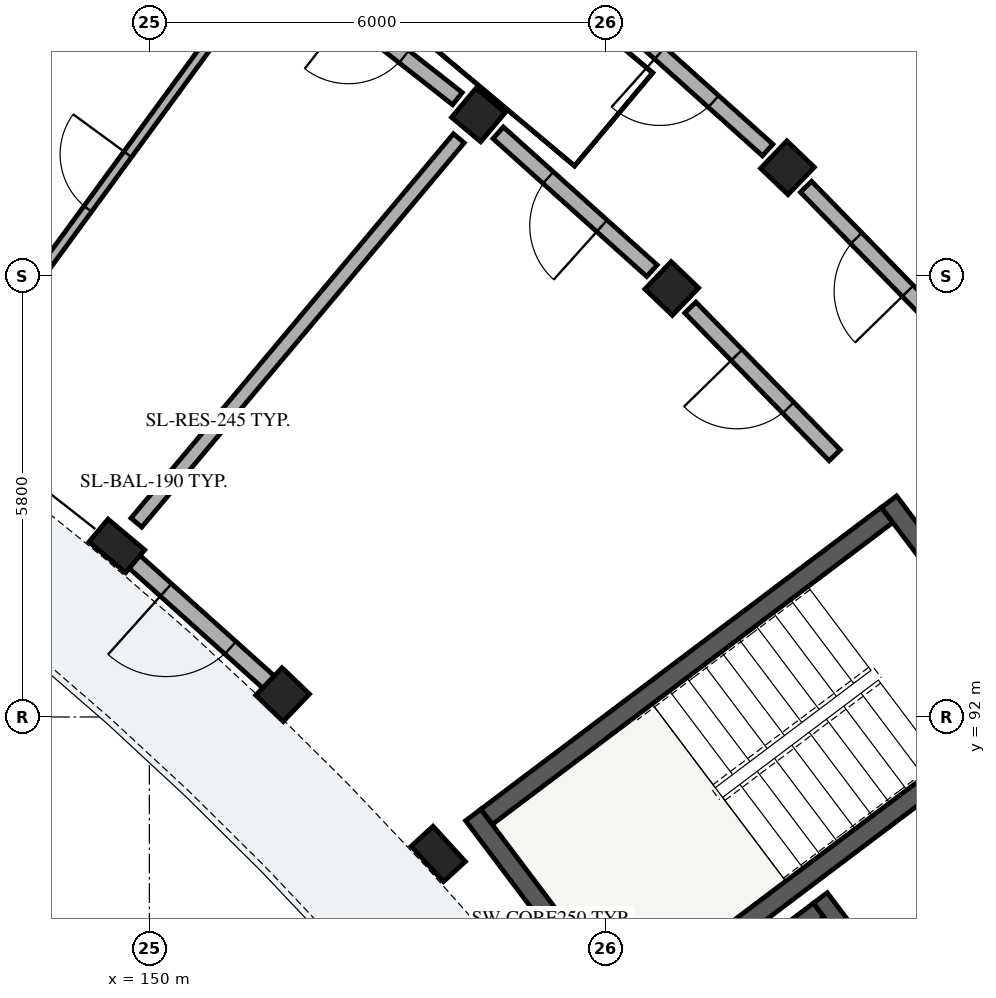
"""IFC4 building model, lengths in metres.
Left out: names, types, materials, properties, quantities, classifications, styles, units other than length and angle.
Written with IfcOpenShell. Run it as: python <this file> out.ifc"""

import sys

from ifc_helpers import new_model, si_unit, direction, frame, frame_2d, origin, origin_2d, place, context, subcontext, project, spatial, rectangle, extrude, element, fill, save


model = new_model("IFC4")
c1 = context("Model", 3, precision=1e-05, world=origin(), true_north=direction((0.0, 1.0)))
c2 = subcontext(c1, "Body", "Model", "MODEL_VIEW")
j1 = project(units=[si_unit("LENGTHUNIT", "METRE"), si_unit("PLANEANGLEUNIT", "RADIAN")], contexts=[c1])
p1 = place(None, origin())
s1 = spatial("IfcSite", under=j1, at=p1, CompositionType="ELEMENT")
p2 = place(p1, origin())
s2 = spatial("IfcBuilding", under=s1, at=p2, CompositionType="ELEMENT")
p3 = place(p2, frame((0.0, 0.0, 32.36)))
s3 = spatial("IfcBuildingStorey", under=s2, at=p3, CompositionType="ELEMENT", Elevation=32.36)
p4 = place(p3, frame((159.707, 94.658, 0.0), z_axis=(0.0, 0.0, 1.0), x_axis=(-0.798639633744, -0.601809550782, 0.0)))
e1 = element("IfcWall", 1, at=p4, inside=s3, PredefinedType="SHEAR", context=c2, shape_type="SweptSolid", body=[
    extrude(rectangle(XDim=6.6, YDim=0.25, at=frame_2d((3.3, 0.0))), origin(), (0.0, 0.0, 1.0), 3.11),
])
p5 = place(p3, frame((154.261, 90.711, 0.0), z_axis=(0.0, 0.0, 1.0), x_axis=(0.601825826579, -0.798627368967, 0.0)))
e2 = element("IfcWall", 2, at=p5, inside=s3, PredefinedType="SHEAR", context=c2, shape_type="SweptSolid", body=[
    extrude(rectangle(XDim=3.42, YDim=0.25, at=frame_2d((1.71, 0.0))), origin(), (0.0, 0.0, 1.0), 3.11),
])
p6 = place(p3, frame((159.731, 94.833, 0.0), z_axis=(0.0, 0.0, 1.0), x_axis=(0.601814606132, -0.798635824294, 0.0)))
e3 = element("IfcWall", 3, at=p6, inside=s3, PredefinedType="SHEAR", context=c2, shape_type="SweptSolid", body=[
    extrude(rectangle(XDim=3.42, YDim=0.25, at=frame_2d((1.71, 0.0))), origin(), (0.0, 0.0, 1.0), 3.11),
])
p7 = place(p3, frame((161.615, 92.126, 0.0), z_axis=(0.0, 0.0, 1.0), x_axis=(-0.798639633744, -0.601809550782, 0.0)))
e4 = element("IfcWall", 4, at=p7, inside=s3, PredefinedType="SHEAR", context=c2, shape_type="SweptSolid", body=[
    extrude(rectangle(XDim=6.6, YDim=0.25, at=frame_2d((3.3, 0.0))), origin(), (0.0, 0.0, 1.0), 3.11),
])
p8 = place(p7, frame((0.22, 0.0, 0.0)))
e5 = element("IfcOpeningElement", 5, at=p8, cuts=e4, PredefinedType="OPENING", context=c2, shape_type="SweptSolid", body=[
    extrude(rectangle(XDim=1.05, YDim=2.15, at=frame_2d((0.525, 1.075))), frame((0.0, 0.135, 0.0), z_axis=(0.0, -1.0, 0.0), x_axis=(1.0, 0.0, 0.0)), (0.0, 0.0, 1.0), 0.27),
])
p9 = place(p3, frame((158.827, 89.619, 0.0), z_axis=(0.0, 0.0, 1.0), x_axis=(0.601819781152, -0.798631924615, 0.0)))
e6 = element("IfcWall", 6, at=p9, inside=s3, PredefinedType="SHEAR", context=c2, shape_type="SweptSolid", body=[
    extrude(rectangle(XDim=3.26, YDim=0.23, at=frame_2d((1.63, 0.0))), origin(), (0.0, 0.0, 1.0), 3.11),
])
p10 = place(p9, frame((0.9, 0.0, 0.0)))
e7 = element("IfcOpeningElement", 7, at=p10, cuts=e6, PredefinedType="OPENING", context=c2, shape_type="SweptSolid", body=[
    extrude(rectangle(XDim=1.1, YDim=2.15, at=frame_2d((0.55, 1.075))), frame((0.0, 0.125, 0.0), z_axis=(0.0, -1.0, 0.0), x_axis=(1.0, 0.0, 0.0)), (0.0, 0.0, 1.0), 0.25),
])
p11 = place(p3, frame((158.805, 89.458, 0.0), z_axis=(0.0, 0.0, 1.0), x_axis=(-0.798608971494, -0.601850239387, 0.0)))
e8 = element("IfcWall", 8, at=p11, inside=s3, PredefinedType="SHEAR", context=c2, shape_type="SweptSolid", body=[
    extrude(rectangle(XDim=2.7, YDim=0.23, at=frame_2d((1.35, 0.0))), origin(), (0.0, 0.0, 1.0), 3.11),
])
p12 = place(p3, frame((153.801, 90.198, 0.0), z_axis=(0.0, 0.0, 1.0), x_axis=(0.73793204255, 0.674875025896, 0.0)))
e9 = element("IfcColumn", 9, at=p12, inside=s3, PredefinedType="PILASTER", context=c2, shape_type="SweptSolid", body=[
    extrude(rectangle(XDim=0.39, YDim=0.63, at=origin_2d()), origin(), (0.0, 0.0, 1.0), 3.115),
])
for number, where, z_axis, x_axis in (
    (10, (151.753, 92.294, 0.0), (0.0, 0.0, 1.0), (0.692, 0.722, 0.0)),
    (11, (156.873, 97.637, 0.0), (0.0, 0.0, 1.0), (0.692, 0.722, 0.0)),
    (12, (158.395, 99.226, 0.0), (0.0, 0.0, 1.0), (0.692, 0.722, 0.0)),
):
    element("IfcColumn", number, at=place(p3, frame(where, z_axis=z_axis, x_axis=x_axis)), inside=s3, PredefinedType="COLUMN", context=c2, shape_type="SweptSolid", body=[
        extrude(rectangle(XDim=0.5, YDim=0.5, at=origin_2d()), origin(), (0.0, 0.0, 1.0), 3.115),
    ])
p13 = place(p3, frame((149.572, 94.251, 0.0), z_axis=(0.0, 0.0, 1.0), x_axis=(0.642787582947, 0.766044465556, 0.0)))
e13 = element("IfcColumn", 13, at=p13, inside=s3, PredefinedType="PILASTER", context=c2, shape_type="SweptSolid", body=[
    extrude(rectangle(XDim=0.39, YDim=0.63, at=origin_2d()), origin(), (0.0, 0.0, 1.0), 3.115),
])
p14 = place(p3, frame((154.329, 99.919, 0.0), z_axis=(0.0, 0.0, 1.0), x_axis=(0.642787582947, 0.766044465556, 0.0)))
e14 = element("IfcColumn", 14, at=p14, inside=s3, PredefinedType="COLUMN", context=c2, shape_type="SweptSolid", body=[
    extrude(rectangle(XDim=0.5, YDim=0.5, at=origin_2d()), origin(), (0.0, 0.0, 1.0), 3.115),
])
p15 = place(p3, frame((151.59, 92.441, 0.0), z_axis=(0.0, 0.0, 1.0), x_axis=(-0.744432975017, 0.667697196121, 0.0)))
e15 = element("IfcWall", 15, at=p15, inside=s3, PredefinedType="SOLIDWALL", context=c2, shape_type="SweptSolid", body=[
    extrude(rectangle(XDim=2.545, YDim=0.22, at=frame_2d((1.272, 0.0))), origin(), (0.0, 0.0, 1.0), 2.355),
])
p16 = place(p15, frame((0.703, 0.0, 0.0)))
e16 = element("IfcOpeningElement", 16, at=p16, cuts=e15, PredefinedType="OPENING", context=c2, shape_type="SweptSolid", body=[
    extrude(rectangle(XDim=1.14, YDim=2.16, at=frame_2d((0.57, 1.08))), frame((0.0, 0.12, 0.0), z_axis=(0.0, -1.0, 0.0), x_axis=(1.0, 0.0, 0.0)), (0.0, 0.0, 1.0), 0.24),
])
p17 = place(p3, frame((160.641, 96.927, 0.0), z_axis=(0.0, 0.0, 1.0), x_axis=(-0.698787219683, 0.715329589496, 0.0)))
e17 = element("IfcWall", 17, at=p17, inside=s3, PredefinedType="PARTITIONING", context=c2, shape_type="SweptSolid", body=[
    extrude(rectangle(XDim=2.863, YDim=0.205, at=frame_2d((1.432, 0.0))), origin(), (0.0, 0.0, 1.0), 2.37),
])
p18 = place(p17, frame((0.947, 0.0, 0.0)))
e18 = element("IfcOpeningElement", 18, at=p18, cuts=e17, PredefinedType="OPENING", context=c2, shape_type="SweptSolid", body=[
    extrude(rectangle(XDim=0.97, YDim=2.15, at=frame_2d((0.485, 1.075))), frame((0.0, 0.113, 0.0), z_axis=(0.0, -1.0, 0.0), x_axis=(1.0, 0.0, 0.0)), (0.0, 0.0, 1.0), 0.225),
])
p19 = place(p3, frame((159.017, 95.443, 0.0), z_axis=(0.0, 0.0, 1.0), x_axis=(-0.698840007829, 0.715278018296, 0.0)))
e19 = element("IfcWall", 19, at=p19, inside=s3, PredefinedType="PARTITIONING", context=c2, shape_type="SweptSolid", body=[
    extrude(rectangle(XDim=2.718, YDim=0.205, at=frame_2d((1.359, 0.0))), origin(), (0.0, 0.0, 1.0), 2.37),
])
p20 = place(p19, frame((0.874, 0.0, 0.0)))
e20 = element("IfcOpeningElement", 20, at=p20, cuts=e19, PredefinedType="OPENING", context=c2, shape_type="SweptSolid", body=[
    extrude(rectangle(XDim=0.97, YDim=2.15, at=frame_2d((0.485, 1.075))), frame((0.0, 0.113, 0.0), z_axis=(0.0, -1.0, 0.0), x_axis=(1.0, 0.0, 0.0)), (0.0, 0.0, 1.0), 0.225),
])
p21 = place(p3, frame((158.135, 99.459, 0.0), z_axis=(0.0, 0.0, 1.0), x_axis=(-0.744433521088, 0.667696587291, 0.0)))
e21 = element("IfcWall", 21, at=p21, inside=s3, PredefinedType="PARTITIONING", context=c2, shape_type="SweptSolid", body=[
    extrude(rectangle(XDim=2.863, YDim=0.205, at=frame_2d((1.432, 0.0))), origin(), (0.0, 0.0, 1.0), 2.37),
])
p22 = place(p21, frame((0.957, 0.0, 0.0)))
e22 = element("IfcOpeningElement", 22, at=p22, cuts=e21, PredefinedType="OPENING", context=c2, shape_type="SweptSolid", body=[
    extrude(rectangle(XDim=0.95, YDim=2.13, at=frame_2d((0.475, 1.065))), frame((0.0, 0.113, 0.0), z_axis=(0.0, -1.0, 0.0), x_axis=(1.0, 0.0, 0.0)), (0.0, 0.0, 1.0), 0.225),
])
p23 = place(p3, frame((156.613, 97.871, 0.0), z_axis=(0.0, 0.0, 1.0), x_axis=(-0.744418559135, 0.667713268413, 0.0)))
e23 = element("IfcWall", 23, at=p23, inside=s3, PredefinedType="PARTITIONING", context=c2, shape_type="SweptSolid", body=[
    extrude(rectangle(XDim=2.718, YDim=0.205, at=frame_2d((1.359, 0.0))), origin(), (0.0, 0.0, 1.0), 2.37),
])
p24 = place(p23, frame((0.884, 0.0, 0.0)))
e24 = element("IfcOpeningElement", 24, at=p24, cuts=e23, PredefinedType="OPENING", context=c2, shape_type="SweptSolid", body=[
    extrude(rectangle(XDim=0.95, YDim=2.13, at=frame_2d((0.475, 1.065))), frame((0.0, 0.113, 0.0), z_axis=(0.0, -1.0, 0.0), x_axis=(1.0, 0.0, 0.0)), (0.0, 0.0, 1.0), 0.225),
])
p25 = place(p3, frame((149.829, 94.557, 0.0), z_axis=(0.0, 0.0, 1.0), x_axis=(0.642789470807, 0.766042881449, 0.0)))
e25 = element("IfcWall", 25, at=p25, inside=s3, PredefinedType="PARTITIONING", context=c2, shape_type="SweptSolid", body=[
    extrude(rectangle(XDim=6.6, YDim=0.185, at=frame_2d((3.3, 0.0))), origin(), (0.0, 0.0, 1.0), 2.37),
])
p26 = place(p3, frame((154.053, 100.135, 0.0), z_axis=(0.0, 0.0, 1.0), x_axis=(-0.786835457019, 0.617162833924, 0.0)))
e26 = element("IfcWall", 26, at=p26, inside=s3, PredefinedType="PARTITIONING", context=c2, shape_type="SweptSolid", body=[
    extrude(rectangle(XDim=2.718, YDim=0.205, at=frame_2d((1.359, 0.0))), origin(), (0.0, 0.0, 1.0), 2.37),
])
p27 = place(p26, frame((0.894, 0.0, 0.0)))
e27 = element("IfcOpeningElement", 27, at=p27, cuts=e26, PredefinedType="OPENING", context=c2, shape_type="SweptSolid", body=[
    extrude(rectangle(XDim=0.93, YDim=2.12, at=frame_2d((0.465, 1.06))), frame((0.0, 0.113, 0.0), z_axis=(0.0, -1.0, 0.0), x_axis=(1.0, 0.0, 0.0)), (0.0, 0.0, 1.0), 0.225),
])
p28 = place(p3, frame((147.503, 96.382, 0.0), z_axis=(0.0, 0.0, 1.0), x_axis=(0.590924179316, 0.806727100263, 0.0)))
e28 = element("IfcWall", 28, at=p28, inside=s3, PredefinedType="PARTITIONING", context=c2, shape_type="SweptSolid", body=[
    extrude(rectangle(XDim=6.6, YDim=0.125, at=frame_2d((3.3, 0.0))), origin(), (0.0, 0.0, 1.0), 2.37),
])
p29 = place(p28, frame((2.855, 0.0, 0.0)))
e29 = element("IfcOpeningElement", 29, at=p29, cuts=e28, PredefinedType="OPENING", context=c2, shape_type="SweptSolid", body=[
    extrude(rectangle(XDim=0.89, YDim=2.1, at=frame_2d((0.445, 1.05))), frame((0.0, 0.073, 0.0), z_axis=(0.0, -1.0, 0.0), x_axis=(1.0, 0.0, 0.0)), (0.0, 0.0, 1.0), 0.145),
])
p30 = place(p16, origin())
e30 = element("IfcDoor", 30, at=p30, inside=s3, OperationType="SINGLE_SWING_RIGHT", PredefinedType="DOOR", context=c2, shape_type="SweptSolid", body=[
    extrude(rectangle(XDim=1.14, YDim=2.16, at=frame_2d((0.57, 1.08))), frame((0.0, 0.025, 0.0), z_axis=(0.0, -1.0, 0.0), x_axis=(1.0, 0.0, 0.0)), (0.0, 0.0, 1.0), 0.05),
])
fill(e16, e30)
p31 = place(p18, origin())
e31 = element("IfcDoor", 31, at=p31, inside=s3, OperationType="SINGLE_SWING_LEFT", PredefinedType="DOOR", context=c2, shape_type="SweptSolid", body=[
    extrude(rectangle(XDim=0.97, YDim=2.15, at=frame_2d((0.485, 1.075))), frame((0.0, 0.025, 0.0), z_axis=(0.0, -1.0, 0.0), x_axis=(1.0, 0.0, 0.0)), (0.0, 0.0, 1.0), 0.05),
])
fill(e18, e31)
p32 = place(p20, origin())
e32 = element("IfcDoor", 32, at=p32, inside=s3, OperationType="SINGLE_SWING_RIGHT", PredefinedType="DOOR", context=c2, shape_type="SweptSolid", body=[
    extrude(rectangle(XDim=0.97, YDim=2.15, at=frame_2d((0.485, 1.075))), frame((0.0, 0.025, 0.0), z_axis=(0.0, -1.0, 0.0), x_axis=(1.0, 0.0, 0.0)), (0.0, 0.0, 1.0), 0.05),
])
fill(e20, e32)
p33 = place(p22, origin())
e33 = element("IfcDoor", 33, at=p33, inside=s3, OperationType="SINGLE_SWING_RIGHT", PredefinedType="DOOR", context=c2, shape_type="SweptSolid", body=[
    extrude(rectangle(XDim=0.95, YDim=2.13, at=frame_2d((0.475, 1.065))), frame((0.0, 0.025, 0.0), z_axis=(0.0, -1.0, 0.0), x_axis=(1.0, 0.0, 0.0)), (0.0, 0.0, 1.0), 0.05),
])
fill(e22, e33)
p34 = place(p24, origin())
e34 = element("IfcDoor", 34, at=p34, inside=s3, OperationType="SINGLE_SWING_LEFT", PredefinedType="DOOR", context=c2, shape_type="SweptSolid", body=[
    extrude(rectangle(XDim=0.95, YDim=2.13, at=frame_2d((0.475, 1.065))), frame((0.0, 0.025, 0.0), z_axis=(0.0, -1.0, 0.0), x_axis=(1.0, 0.0, 0.0)), (0.0, 0.0, 1.0), 0.05),
])
fill(e24, e34)
p35 = place(p27, origin())
e35 = element("IfcDoor", 35, at=p35, inside=s3, OperationType="SINGLE_SWING_RIGHT", PredefinedType="DOOR", context=c2, shape_type="SweptSolid", body=[
    extrude(rectangle(XDim=0.93, YDim=2.12, at=frame_2d((0.465, 1.06))), frame((0.0, 0.025, 0.0), z_axis=(0.0, -1.0, 0.0), x_axis=(1.0, 0.0, 0.0)), (0.0, 0.0, 1.0), 0.05),
])
fill(e27, e35)
p36 = place(p29, origin())
e36 = element("IfcDoor", 36, at=p36, inside=s3, OperationType="SINGLE_SWING_RIGHT", PredefinedType="DOOR", context=c2, shape_type="SweptSolid", body=[
    extrude(rectangle(XDim=0.89, YDim=2.1, at=frame_2d((0.445, 1.05))), frame((0.0, 0.025, 0.0), z_axis=(0.0, -1.0, 0.0), x_axis=(1.0, 0.0, 0.0)), (0.0, 0.0, 1.0), 0.05),
])
fill(e29, e36)
save(model, sys.argv[1])
